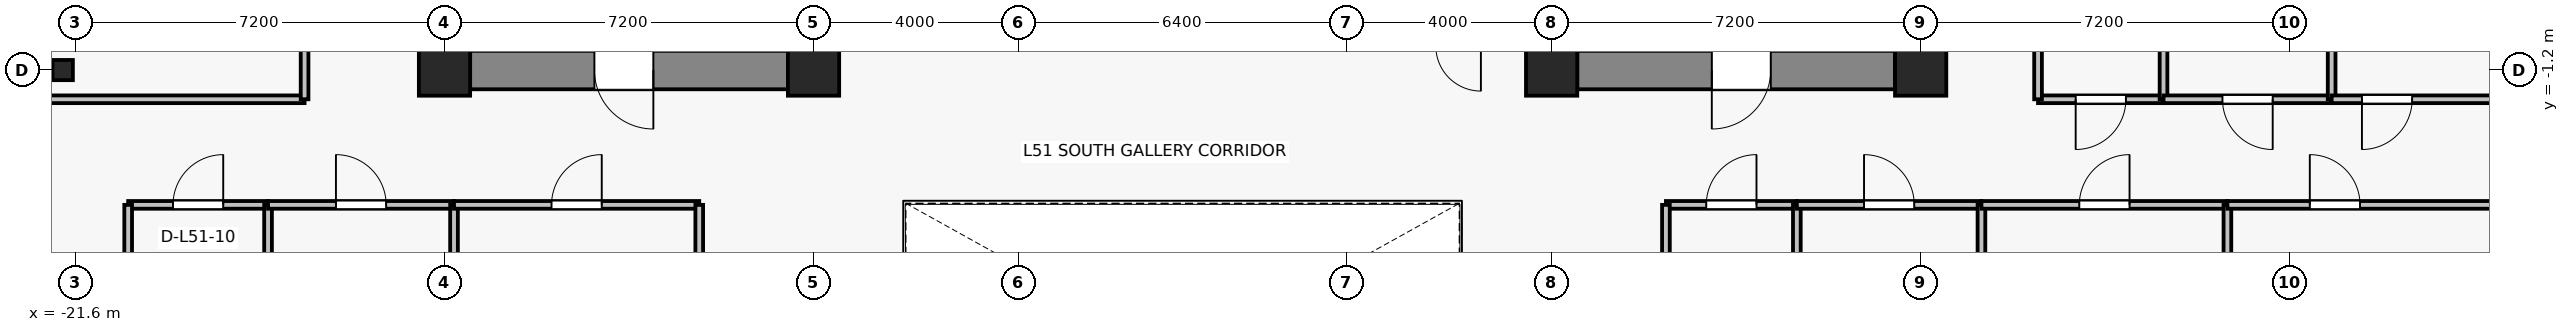
"""IFC4 building model, lengths in metres.
Left out: names, types, materials, properties, quantities, classifications, styles, units other than length and angle.
Written with IfcOpenShell. Run it as: python <this file> out.ifc"""

import sys

from ifc_helpers import new_model, si_unit, direction, frame, frame_2d, origin, origin_2d, place, context, subcontext, project, spatial, rectangle, i_section, extrude, source, transform, mapped, element, fill, save


model = new_model("IFC4")
c1 = context("Model", 3, precision=1e-05, world=origin(), true_north=direction((0.0, 1.0)))
c2 = subcontext(c1, "Body", "Model", "MODEL_VIEW")
j1 = project(units=[si_unit("LENGTHUNIT", "METRE"), si_unit("PLANEANGLEUNIT", "RADIAN")], contexts=[c1])
p1 = place(None, origin())
s1 = spatial("IfcSite", under=j1, at=p1, CompositionType="ELEMENT")
p2 = place(p1, origin())
s2 = spatial("IfcBuilding", under=s1, at=p2, CompositionType="ELEMENT")
p3 = place(p2, frame((0.0, 0.0, 182.5)))
s3 = spatial("IfcBuildingStorey", under=s2, at=p3, CompositionType="ELEMENT", Elevation=182.5)
for number, where, z_axis, x_axis in (
    (1, (-14.4, -1.2, 0.0), (0.0, 0.0, 1.0), (1.0, 0.0, 0.0)),
    (2, (-7.2, -1.2, 0.0), (0.0, 0.0, 1.0), (1.0, 0.0, 0.0)),
    (3, (7.2, -1.2, 0.0), (0.0, 0.0, 1.0), (1.0, 0.0, 0.0)),
    (4, (14.4, -1.2, 0.0), (0.0, 0.0, 1.0), (1.0, 0.0, 0.0)),
):
    element("IfcColumn", number, at=place(p3, frame(where, z_axis=z_axis, x_axis=x_axis)), inside=s3, PredefinedType="COLUMN", context=c2, shape_type="SweptSolid", body=[
        extrude(rectangle(XDim=1.0, YDim=1.0, at=origin_2d()), origin(), (0.0, 0.0, 1.0), 3.3),
    ])
p4 = place(p3, frame((-21.85, -1.2, 0.0), z_axis=(0.0, 0.0, 1.0), x_axis=(1.0, 0.0, 0.0)))
e5 = element("IfcColumn", 5, at=p4, inside=s3, PredefinedType="COLUMN", context=c2, shape_type="SweptSolid", body=[
    extrude(i_section(OverallWidth=0.399, OverallDepth=0.394, WebThickness=0.023, FlangeThickness=0.037, FilletRadius=0.015, at=origin_2d()), origin(), (0.0, 0.0, 1.0), 3.3),
])
p5 = place(p3, frame((-7.7, -1.2, 0.0), z_axis=(0.0, 0.0, 1.0), x_axis=(-1.0, 0.0, 0.0)))
e6 = element("IfcWall", 6, at=p5, inside=s3, PredefinedType="SHEAR", context=c2, shape_type="SweptSolid", body=[
    extrude(rectangle(XDim=6.2, YDim=0.75, at=frame_2d((3.1, 0.0))), origin(), (0.0, 0.0, 1.0), 3.075),
])
p6 = place(p5, frame((2.625, 0.0, 0.0)))
e7 = element("IfcOpeningElement", 7, at=p6, cuts=e6, PredefinedType="OPENING", context=c2, shape_type="SweptSolid", body=[
    extrude(rectangle(XDim=1.15, YDim=2.15, at=frame_2d((0.575, 1.075))), frame((0.0, 0.385, 0.0), z_axis=(0.0, -1.0, 0.0), x_axis=(1.0, 0.0, 0.0)), (0.0, 0.0, 1.0), 0.77),
])
p7 = place(p3, frame((13.9, -1.2, 0.0), z_axis=(0.0, 0.0, 1.0), x_axis=(-1.0, 0.0, 0.0)))
e8 = element("IfcWall", 8, at=p7, inside=s3, PredefinedType="SHEAR", context=c2, shape_type="SweptSolid", body=[
    extrude(rectangle(XDim=6.2, YDim=0.75, at=frame_2d((3.1, 0.0))), origin(), (0.0, 0.0, 1.0), 3.075),
])
p8 = place(p7, frame((2.425, 0.0, 0.0)))
e9 = element("IfcOpeningElement", 9, at=p8, cuts=e8, PredefinedType="OPENING", context=c2, shape_type="SweptSolid", body=[
    extrude(rectangle(XDim=1.15, YDim=2.15, at=frame_2d((0.575, 1.075))), frame((0.0, 0.385, 0.0), z_axis=(0.0, -1.0, 0.0), x_axis=(1.0, 0.0, 0.0)), (0.0, 0.0, 1.0), 0.77),
])
p9 = place(p3, frame((-20.572, -3.83, 0.0), z_axis=(0.0, 0.0, 1.0), x_axis=(1.0, 0.0, 0.0)))
e10 = element("IfcWall", 10, at=p9, inside=s3, PredefinedType="PARTITIONING", context=c2, shape_type="SweptSolid", body=[
    extrude(rectangle(XDim=2.729, YDim=0.15, at=frame_2d((1.365, 0.0))), origin(), (0.0, 0.0, 1.0), 3.075),
])
p10 = place(p9, frame((0.875, 0.0, 0.0)))
e11 = element("IfcOpeningElement", 11, at=p10, cuts=e10, PredefinedType="OPENING", context=c2, shape_type="SweptSolid", body=[
    extrude(rectangle(XDim=0.98, YDim=2.15, at=frame_2d((0.49, 1.075))), frame((0.0, 0.085, 0.0), z_axis=(0.0, -1.0, 0.0), x_axis=(1.0, 0.0, 0.0)), (0.0, 0.0, 1.0), 0.17),
])
for number, where, z_axis, x_axis in (
    (12, (-20.572, -7.12, 0.0), (0.0, 0.0, 1.0), (0.0, 1.0, 0.0)),
    (13, (-17.843, -3.83, 0.0), (0.0, 0.0, 1.0), (0.0, -1.0, 0.0)),
):
    element("IfcWall", number, at=place(p3, frame(where, z_axis=z_axis, x_axis=x_axis)), inside=s3, PredefinedType="PARTITIONING", context=c2, shape_type="SweptSolid", body=[
        extrude(rectangle(XDim=3.29, YDim=0.15, at=frame_2d((1.645, 0.0))), origin(), (0.0, 0.0, 1.0), 2.665),
    ])
p11 = place(p3, frame((-17.843, -3.83, 0.0), z_axis=(0.0, 0.0, 1.0), x_axis=(1.0, 0.0, 0.0)))
e14 = element("IfcWall", 14, at=p11, inside=s3, PredefinedType="PARTITIONING", context=c2, shape_type="SweptSolid", body=[
    extrude(rectangle(XDim=3.628, YDim=0.15, at=frame_2d((1.814, 0.0))), origin(), (0.0, 0.0, 1.0), 2.565),
])
p12 = place(p11, frame((1.324, 0.0, 0.0)))
e15 = element("IfcOpeningElement", 15, at=p12, cuts=e14, PredefinedType="OPENING", context=c2, shape_type="SweptSolid", body=[
    extrude(rectangle(XDim=0.98, YDim=2.15, at=frame_2d((0.49, 1.075))), frame((0.0, 0.085, 0.0), z_axis=(0.0, -1.0, 0.0), x_axis=(1.0, 0.0, 0.0)), (0.0, 0.0, 1.0), 0.17),
])
p13 = place(p3, frame((-14.214, -3.83, 0.0), z_axis=(0.0, 0.0, 1.0), x_axis=(0.0, -1.0, 0.0)))
e16 = element("IfcWall", 16, at=p13, inside=s3, PredefinedType="PARTITIONING", context=c2, shape_type="SweptSolid", body=[
    extrude(rectangle(XDim=3.29, YDim=0.15, at=frame_2d((1.645, 0.0))), origin(), (0.0, 0.0, 1.0), 2.565),
])
p14 = place(p3, frame((-14.214, -3.83, 0.0), z_axis=(0.0, 0.0, 1.0), x_axis=(1.0, 0.0, 0.0)))
e17 = element("IfcWall", 17, at=p14, inside=s3, PredefinedType="PARTITIONING", context=c2, shape_type="SweptSolid", body=[
    extrude(rectangle(XDim=4.784, YDim=0.15, at=frame_2d((2.392, 0.0))), origin(), (0.0, 0.0, 1.0), 2.565),
])
p15 = place(p14, frame((1.902, 0.0, 0.0)))
e18 = element("IfcOpeningElement", 18, at=p15, cuts=e17, PredefinedType="OPENING", context=c2, shape_type="SweptSolid", body=[
    extrude(rectangle(XDim=0.98, YDim=2.15, at=frame_2d((0.49, 1.075))), frame((0.0, 0.085, 0.0), z_axis=(0.0, -1.0, 0.0), x_axis=(1.0, 0.0, 0.0)), (0.0, 0.0, 1.0), 0.17),
])
p16 = place(p3, frame((-9.43, -3.83, 0.0), z_axis=(0.0, 0.0, 1.0), x_axis=(0.0, -1.0, 0.0)))
e19 = element("IfcWall", 19, at=p16, inside=s3, PredefinedType="PARTITIONING", context=c2, shape_type="SweptSolid", body=[
    extrude(rectangle(XDim=3.29, YDim=0.15, at=frame_2d((1.645, 0.0))), origin(), (0.0, 0.0, 1.0), 2.665),
])
p17 = place(p3, frame((9.43, -3.83, 0.0), z_axis=(0.0, 0.0, 1.0), x_axis=(1.0, 0.0, 0.0)))
e20 = element("IfcWall", 20, at=p17, inside=s3, PredefinedType="PARTITIONING", context=c2, shape_type="SweptSolid", body=[
    extrude(rectangle(XDim=2.554, YDim=0.15, at=frame_2d((1.277, 0.0))), origin(), (0.0, 0.0, 1.0), 3.075),
])
p18 = place(p17, frame((0.787, 0.0, 0.0)))
e21 = element("IfcOpeningElement", 21, at=p18, cuts=e20, PredefinedType="OPENING", context=c2, shape_type="SweptSolid", body=[
    extrude(rectangle(XDim=0.98, YDim=2.15, at=frame_2d((0.49, 1.075))), frame((0.0, 0.085, 0.0), z_axis=(0.0, -1.0, 0.0), x_axis=(1.0, 0.0, 0.0)), (0.0, 0.0, 1.0), 0.17),
])
for number, where, z_axis, x_axis in (
    (22, (9.43, -7.12, 0.0), (0.0, 0.0, 1.0), (0.0, 1.0, 0.0)),
    (23, (11.984, -3.83, 0.0), (0.0, 0.0, 1.0), (0.0, -1.0, 0.0)),
):
    element("IfcWall", number, at=place(p3, frame(where, z_axis=z_axis, x_axis=x_axis)), inside=s3, PredefinedType="PARTITIONING", context=c2, shape_type="SweptSolid", body=[
        extrude(rectangle(XDim=3.29, YDim=0.15, at=frame_2d((1.645, 0.0))), origin(), (0.0, 0.0, 1.0), 2.665),
    ])
p19 = place(p3, frame((11.984, -3.83, 0.0), z_axis=(0.0, 0.0, 1.0), x_axis=(1.0, 0.0, 0.0)))
e24 = element("IfcWall", 24, at=p19, inside=s3, PredefinedType="PARTITIONING", context=c2, shape_type="SweptSolid", body=[
    extrude(rectangle(XDim=3.602, YDim=0.15, at=frame_2d((1.801, 0.0))), origin(), (0.0, 0.0, 1.0), 2.565),
])
p20 = place(p19, frame((1.311, 0.0, 0.0)))
e25 = element("IfcOpeningElement", 25, at=p20, cuts=e24, PredefinedType="OPENING", context=c2, shape_type="SweptSolid", body=[
    extrude(rectangle(XDim=0.98, YDim=2.15, at=frame_2d((0.49, 1.075))), frame((0.0, 0.085, 0.0), z_axis=(0.0, -1.0, 0.0), x_axis=(1.0, 0.0, 0.0)), (0.0, 0.0, 1.0), 0.17),
])
p21 = place(p3, frame((15.586, -3.83, 0.0), z_axis=(0.0, 0.0, 1.0), x_axis=(0.0, -1.0, 0.0)))
e26 = element("IfcWall", 26, at=p21, inside=s3, PredefinedType="PARTITIONING", context=c2, shape_type="SweptSolid", body=[
    extrude(rectangle(XDim=3.29, YDim=0.15, at=frame_2d((1.645, 0.0))), origin(), (0.0, 0.0, 1.0), 3.075),
])
p22 = place(p3, frame((15.586, -3.83, 0.0), z_axis=(0.0, 0.0, 1.0), x_axis=(1.0, 0.0, 0.0)))
e27 = element("IfcWall", 27, at=p22, inside=s3, PredefinedType="PARTITIONING", context=c2, shape_type="SweptSolid", body=[
    extrude(rectangle(XDim=4.799, YDim=0.15, at=frame_2d((2.399, 0.0))), origin(), (0.0, 0.0, 1.0), 3.075),
])
p23 = place(p22, frame((1.909, 0.0, 0.0)))
e28 = element("IfcOpeningElement", 28, at=p23, cuts=e27, PredefinedType="OPENING", context=c2, shape_type="SweptSolid", body=[
    extrude(rectangle(XDim=0.98, YDim=2.15, at=frame_2d((0.49, 1.075))), frame((0.0, 0.085, 0.0), z_axis=(0.0, -1.0, 0.0), x_axis=(1.0, 0.0, 0.0)), (0.0, 0.0, 1.0), 0.17),
])
p24 = place(p3, frame((20.385, -3.83, 0.0), z_axis=(0.0, 0.0, 1.0), x_axis=(0.0, -1.0, 0.0)))
e29 = element("IfcWall", 29, at=p24, inside=s3, PredefinedType="PARTITIONING", context=c2, shape_type="SweptSolid", body=[
    extrude(rectangle(XDim=3.29, YDim=0.15, at=frame_2d((1.645, 0.0))), origin(), (0.0, 0.0, 1.0), 3.075),
])
p25 = place(p3, frame((20.385, -3.83, 0.0), z_axis=(0.0, 0.0, 1.0), x_axis=(1.0, 0.0, 0.0)))
e30 = element("IfcWall", 30, at=p25, inside=s3, PredefinedType="PARTITIONING", context=c2, shape_type="SweptSolid", body=[
    extrude(rectangle(XDim=6.146, YDim=0.15, at=frame_2d((3.073, 0.0))), origin(), (0.0, 0.0, 1.0), 2.565),
])
p26 = place(p25, frame((1.607, 0.0, 0.0)))
e31 = element("IfcOpeningElement", 31, at=p26, cuts=e30, PredefinedType="OPENING", context=c2, shape_type="SweptSolid", body=[
    extrude(rectangle(XDim=0.98, YDim=2.15, at=frame_2d((0.49, 1.075))), frame((0.0, 0.085, 0.0), z_axis=(0.0, -1.0, 0.0), x_axis=(1.0, 0.0, 0.0)), (0.0, 0.0, 1.0), 0.17),
])
p27 = place(p3, frame((-17.13, -1.77, 0.0), z_axis=(0.0, 0.0, 1.0), x_axis=(-1.0, 0.0, 0.0)))
e32 = element("IfcWall", 32, at=p27, inside=s3, PredefinedType="PARTITIONING", context=c2, shape_type="SweptSolid", body=[
    extrude(rectangle(XDim=5.4, YDim=0.15, at=frame_2d((2.7, 0.0))), origin(), (0.0, 0.0, 1.0), 2.565),
])
p28 = place(p3, frame((-17.13, 13.88, 0.0), z_axis=(0.0, 0.0, 1.0), x_axis=(0.0, -1.0, 0.0)))
e33 = element("IfcWall", 33, at=p28, inside=s3, PredefinedType="PARTITIONING", context=c2, shape_type="SweptSolid", body=[
    extrude(rectangle(XDim=15.65, YDim=0.15, at=frame_2d((7.825, 0.0))), origin(), (0.0, 0.0, 1.0), 2.565),
])
p29 = place(p28, frame((7.335, 0.0, 0.0)))
e34 = element("IfcOpeningElement", 34, at=p29, cuts=e33, PredefinedType="OPENING", context=c2, shape_type="SweptSolid", body=[
    extrude(rectangle(XDim=0.98, YDim=2.15, at=frame_2d((0.49, 1.075))), frame((0.0, 0.085, 0.0), z_axis=(0.0, -1.0, 0.0), x_axis=(1.0, 0.0, 0.0)), (0.0, 0.0, 1.0), 0.17),
])
p30 = place(p3, frame((19.138, -1.77, 0.0), z_axis=(0.0, 0.0, 1.0), x_axis=(-1.0, 0.0, 0.0)))
e35 = element("IfcWall", 35, at=p30, inside=s3, PredefinedType="PARTITIONING", context=c2, shape_type="SweptSolid", body=[
    extrude(rectangle(XDim=2.448, YDim=0.15, at=frame_2d((1.224, 0.0))), origin(), (0.0, 0.0, 1.0), 3.075),
])
p31 = place(p30, frame((0.734, 0.0, 0.0)))
e36 = element("IfcOpeningElement", 36, at=p31, cuts=e35, PredefinedType="OPENING", context=c2, shape_type="SweptSolid", body=[
    extrude(rectangle(XDim=0.98, YDim=2.15, at=frame_2d((0.49, 1.075))), frame((0.0, 0.085, 0.0), z_axis=(0.0, -1.0, 0.0), x_axis=(1.0, 0.0, 0.0)), (0.0, 0.0, 1.0), 0.17),
])
for number, where, z_axis, x_axis in (
    (37, (16.69, -1.77, 0.0), (0.0, 0.0, 1.0), (0.0, 1.0, 0.0)),
    (38, (19.138, 13.88, 0.0), (0.0, 0.0, 1.0), (0.0, -1.0, 0.0)),
):
    element("IfcWall", number, at=place(p3, frame(where, z_axis=z_axis, x_axis=x_axis)), inside=s3, PredefinedType="PARTITIONING", context=c2, shape_type="SweptSolid", body=[
        extrude(rectangle(XDim=15.65, YDim=0.15, at=frame_2d((7.825, 0.0))), origin(), (0.0, 0.0, 1.0), 2.565),
    ])
p32 = place(p3, frame((22.418, -1.77, 0.0), z_axis=(0.0, 0.0, 1.0), x_axis=(-1.0, 0.0, 0.0)))
e39 = element("IfcWall", 39, at=p32, inside=s3, PredefinedType="PARTITIONING", context=c2, shape_type="SweptSolid", body=[
    extrude(rectangle(XDim=3.28, YDim=0.15, at=frame_2d((1.64, 0.0))), origin(), (0.0, 0.0, 1.0), 3.075),
])
p33 = place(p32, frame((1.15, 0.0, 0.0)))
e40 = element("IfcOpeningElement", 40, at=p33, cuts=e39, PredefinedType="OPENING", context=c2, shape_type="SweptSolid", body=[
    extrude(rectangle(XDim=0.98, YDim=2.15, at=frame_2d((0.49, 1.075))), frame((0.0, 0.085, 0.0), z_axis=(0.0, -1.0, 0.0), x_axis=(1.0, 0.0, 0.0)), (0.0, 0.0, 1.0), 0.17),
])
p34 = place(p3, frame((22.418, 13.88, 0.0), z_axis=(0.0, 0.0, 1.0), x_axis=(0.0, -1.0, 0.0)))
e41 = element("IfcWall", 41, at=p34, inside=s3, PredefinedType="PARTITIONING", context=c2, shape_type="SweptSolid", body=[
    extrude(rectangle(XDim=15.65, YDim=0.15, at=frame_2d((7.825, 0.0))), origin(), (0.0, 0.0, 1.0), 2.565),
])
p35 = place(p3, frame((26.53, -1.77, 0.0), z_axis=(0.0, 0.0, 1.0), x_axis=(-1.0, 0.0, 0.0)))
e42 = element("IfcWall", 42, at=p35, inside=s3, PredefinedType="PARTITIONING", context=c2, shape_type="SweptSolid", body=[
    extrude(rectangle(XDim=4.112, YDim=0.15, at=frame_2d((2.056, 0.0))), origin(), (0.0, 0.0, 1.0), 2.565),
])
p36 = place(p35, frame((2.541, 0.0, 0.0)))
e43 = element("IfcOpeningElement", 43, at=p36, cuts=e42, PredefinedType="OPENING", context=c2, shape_type="SweptSolid", body=[
    extrude(rectangle(XDim=0.98, YDim=2.15, at=frame_2d((0.49, 1.075))), frame((0.0, 0.085, 0.0), z_axis=(0.0, -1.0, 0.0), x_axis=(1.0, 0.0, 0.0)), (0.0, 0.0, 1.0), 0.17),
])
m1 = source(origin(), c2, "Body", "SweptSolid", [
    extrude(rectangle(XDim=1.15, YDim=2.15, at=frame_2d((0.575, 1.075))), frame((0.0, 0.025, 0.0), z_axis=(0.0, -1.0, 0.0), x_axis=(1.0, 0.0, 0.0)), (0.0, 0.0, 1.0), 0.05),
])
p37 = place(p6, origin())
e44 = element("IfcDoor", 44, at=p37, inside=s3, OperationType="SINGLE_SWING_LEFT", PredefinedType="DOOR", context=c2, shape_type="MappedRepresentation", body=[
    mapped(m1, transform((0.0, 0.0, 0.0), x_axis=(1.0, 0.0, 0.0), y_axis=(0.0, 1.0, 0.0), z_axis=(0.0, 0.0, 1.0), scale=1.0)),
])
fill(e7, e44)
p38 = place(p8, origin())
e45 = element("IfcDoor", 45, at=p38, inside=s3, OperationType="SINGLE_SWING_RIGHT", PredefinedType="DOOR", context=c2, shape_type="MappedRepresentation", body=[
    mapped(m1, transform((0.0, 0.0, 0.0), x_axis=(1.0, 0.0, 0.0), y_axis=(0.0, 1.0, 0.0), z_axis=(0.0, 0.0, 1.0), scale=1.0)),
])
fill(e9, e45)
m2 = source(origin(), c2, "Body", "SweptSolid", [
    extrude(rectangle(XDim=0.98, YDim=2.15, at=frame_2d((0.49, 1.075))), frame((0.0, 0.025, 0.0), z_axis=(0.0, -1.0, 0.0), x_axis=(1.0, 0.0, 0.0)), (0.0, 0.0, 1.0), 0.05),
])
p39 = place(p10, origin())
e46 = element("IfcDoor", 46, at=p39, inside=s3, OperationType="SINGLE_SWING_RIGHT", PredefinedType="DOOR", context=c2, shape_type="MappedRepresentation", body=[
    mapped(m2, transform((0.0, 0.0, 0.0), x_axis=(1.0, 0.0, 0.0), y_axis=(0.0, 1.0, 0.0), z_axis=(0.0, 0.0, 1.0), scale=1.0)),
])
fill(e11, e46)
p40 = place(p12, origin())
e47 = element("IfcDoor", 47, at=p40, inside=s3, OperationType="SINGLE_SWING_LEFT", PredefinedType="DOOR", context=c2, shape_type="MappedRepresentation", body=[
    mapped(m2, transform((0.0, 0.0, 0.0), x_axis=(1.0, 0.0, 0.0), y_axis=(0.0, 1.0, 0.0), z_axis=(0.0, 0.0, 1.0), scale=1.0)),
])
fill(e15, e47)
p41 = place(p15, origin())
e48 = element("IfcDoor", 48, at=p41, inside=s3, OperationType="SINGLE_SWING_RIGHT", PredefinedType="DOOR", context=c2, shape_type="MappedRepresentation", body=[
    mapped(m2, transform((0.0, 0.0, 0.0), x_axis=(1.0, 0.0, 0.0), y_axis=(0.0, 1.0, 0.0), z_axis=(0.0, 0.0, 1.0), scale=1.0)),
])
fill(e18, e48)
p42 = place(p18, origin())
e49 = element("IfcDoor", 49, at=p42, inside=s3, OperationType="SINGLE_SWING_RIGHT", PredefinedType="DOOR", context=c2, shape_type="MappedRepresentation", body=[
    mapped(m2, transform((0.0, 0.0, 0.0), x_axis=(1.0, 0.0, 0.0), y_axis=(0.0, 1.0, 0.0), z_axis=(0.0, 0.0, 1.0), scale=1.0)),
])
fill(e21, e49)
p43 = place(p20, origin())
e50 = element("IfcDoor", 50, at=p43, inside=s3, OperationType="SINGLE_SWING_LEFT", PredefinedType="DOOR", context=c2, shape_type="MappedRepresentation", body=[
    mapped(m2, transform((0.0, 0.0, 0.0), x_axis=(1.0, 0.0, 0.0), y_axis=(0.0, 1.0, 0.0), z_axis=(0.0, 0.0, 1.0), scale=1.0)),
])
fill(e25, e50)
p44 = place(p23, origin())
e51 = element("IfcDoor", 51, at=p44, inside=s3, OperationType="SINGLE_SWING_RIGHT", PredefinedType="DOOR", context=c2, shape_type="MappedRepresentation", body=[
    mapped(m2, transform((0.0, 0.0, 0.0), x_axis=(1.0, 0.0, 0.0), y_axis=(0.0, 1.0, 0.0), z_axis=(0.0, 0.0, 1.0), scale=1.0)),
])
fill(e28, e51)
p45 = place(p26, origin())
e52 = element("IfcDoor", 52, at=p45, inside=s3, OperationType="SINGLE_SWING_LEFT", PredefinedType="DOOR", context=c2, shape_type="MappedRepresentation", body=[
    mapped(m2, transform((0.0, 0.0, 0.0), x_axis=(1.0, 0.0, 0.0), y_axis=(0.0, 1.0, 0.0), z_axis=(0.0, 0.0, 1.0), scale=1.0)),
])
fill(e31, e52)
p46 = place(p31, origin())
e53 = element("IfcDoor", 53, at=p46, inside=s3, OperationType="SINGLE_SWING_RIGHT", PredefinedType="DOOR", context=c2, shape_type="MappedRepresentation", body=[
    mapped(m2, transform((0.0, 0.0, 0.0), x_axis=(1.0, 0.0, 0.0), y_axis=(0.0, 1.0, 0.0), z_axis=(0.0, 0.0, 1.0), scale=1.0)),
])
fill(e36, e53)
p47 = place(p33, origin())
e54 = element("IfcDoor", 54, at=p47, inside=s3, OperationType="SINGLE_SWING_LEFT", PredefinedType="DOOR", context=c2, shape_type="MappedRepresentation", body=[
    mapped(m2, transform((0.0, 0.0, 0.0), x_axis=(1.0, 0.0, 0.0), y_axis=(0.0, 1.0, 0.0), z_axis=(0.0, 0.0, 1.0), scale=1.0)),
])
fill(e40, e54)
p48 = place(p36, origin())
e55 = element("IfcDoor", 55, at=p48, inside=s3, OperationType="SINGLE_SWING_RIGHT", PredefinedType="DOOR", context=c2, shape_type="MappedRepresentation", body=[
    mapped(m2, transform((0.0, 0.0, 0.0), x_axis=(1.0, 0.0, 0.0), y_axis=(0.0, 1.0, 0.0), z_axis=(0.0, 0.0, 1.0), scale=1.0)),
])
fill(e43, e55)
save(model, sys.argv[1])
